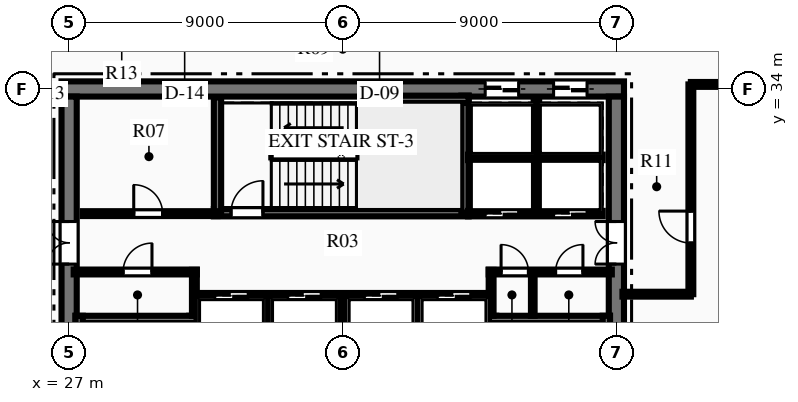
"""IFC4 building model, lengths in metres.
Left out: names, types, materials, properties, quantities, classifications, styles, units other than length and angle.
Written with IfcOpenShell. Run it as: python <this file> out.ifc"""

import sys

from ifc_helpers import new_model, si_unit, direction, frame, frame_2d, origin, place, context, subcontext, project, spatial, rectangle, extrude, element, fill, save


model = new_model("IFC4")
c1 = context("Model", 3, precision=1e-05, world=origin(), true_north=direction((0.0, 1.0)))
c2 = subcontext(c1, "Body", "Model", "MODEL_VIEW")
j1 = project(units=[si_unit("LENGTHUNIT", "METRE"), si_unit("PLANEANGLEUNIT", "RADIAN")], contexts=[c1])
p1 = place(None, origin())
s1 = spatial("IfcSite", under=j1, at=p1, CompositionType="ELEMENT")
p2 = place(p1, origin())
s2 = spatial("IfcBuilding", under=s1, at=p2, CompositionType="ELEMENT")
p3 = place(p2, frame((0.0, 0.0, 148.2)))
s3 = spatial("IfcBuildingStorey", under=s2, at=p3, CompositionType="ELEMENT", Elevation=148.2)
p4 = place(p3, frame((26.75, 34.0, 0.0), z_axis=(0.0, 0.0, 1.0), x_axis=(1.0, 0.0, 0.0)))
e1 = element("IfcWall", 1, at=p4, inside=s3, PredefinedType="SHEAR", context=c2, shape_type="SweptSolid", body=[
    extrude(rectangle(XDim=18.5, YDim=0.5, at=frame_2d((9.25, 0.0))), origin(), (0.0, 0.0, 1.0), 3.75),
])
p5 = place(p4, frame((13.935, 0.0, 0.0)))
e2 = element("IfcOpeningElement", 2, at=p5, cuts=e1, PredefinedType="OPENING", context=c2, shape_type="SweptSolid", body=[
    extrude(rectangle(XDim=1.1, YDim=2.15, at=frame_2d((0.55, 1.075))), frame((0.0, 0.26, 0.0), z_axis=(0.0, -1.0, 0.0), x_axis=(1.0, 0.0, 0.0)), (0.0, 0.0, 1.0), 0.52),
])
p6 = place(p4, frame((16.185, 0.0, 0.0)))
e3 = element("IfcOpeningElement", 3, at=p6, cuts=e1, PredefinedType="OPENING", context=c2, shape_type="SweptSolid", body=[
    extrude(rectangle(XDim=1.1, YDim=2.15, at=frame_2d((0.55, 1.075))), frame((0.0, 0.26, 0.0), z_axis=(0.0, -1.0, 0.0), x_axis=(1.0, 0.0, 0.0)), (0.0, 0.0, 1.0), 0.52),
])
p7 = place(p3, frame((27.0, 18.25, 0.0), z_axis=(0.0, 0.0, 1.0), x_axis=(0.0, 1.0, 0.0)))
e4 = element("IfcWall", 4, at=p7, inside=s3, PredefinedType="SHEAR", context=c2, shape_type="SweptSolid", body=[
    extrude(rectangle(XDim=15.5, YDim=0.5, at=frame_2d((7.75, 0.0))), origin(), (0.0, 0.0, 1.0), 3.75),
])
p8 = place(p7, frame((9.99, 0.0, 0.0)))
e5 = element("IfcOpeningElement", 5, at=p8, cuts=e4, PredefinedType="OPENING", context=c2, shape_type="SweptSolid", body=[
    extrude(rectangle(XDim=1.4, YDim=2.2, at=frame_2d((0.7, 1.1))), frame((0.0, 0.26, 0.0), z_axis=(0.0, -1.0, 0.0), x_axis=(1.0, 0.0, 0.0)), (0.0, 0.0, 1.0), 0.52),
])
p9 = place(p3, frame((45.0, 18.25, 0.0), z_axis=(0.0, 0.0, 1.0), x_axis=(0.0, 1.0, 0.0)))
e6 = element("IfcWall", 6, at=p9, inside=s3, PredefinedType="SHEAR", context=c2, shape_type="SweptSolid", body=[
    extrude(rectangle(XDim=15.5, YDim=0.5, at=frame_2d((7.75, 0.0))), origin(), (0.0, 0.0, 1.0), 3.75),
])
p10 = place(p9, frame((9.99, 0.0, 0.0)))
e7 = element("IfcOpeningElement", 7, at=p10, cuts=e6, PredefinedType="OPENING", context=c2, shape_type="SweptSolid", body=[
    extrude(rectangle(XDim=1.4, YDim=2.2, at=frame_2d((0.7, 1.1))), frame((0.0, 0.26, 0.0), z_axis=(0.0, -1.0, 0.0), x_axis=(1.0, 0.0, 0.0)), (0.0, 0.0, 1.0), 0.52),
])
p11 = place(p3, frame((31.07, 18.28, 0.0), z_axis=(0.0, 0.0, 1.0), x_axis=(0.0, 1.0, 0.0)))
e8 = element("IfcWall", 8, at=p11, inside=s3, PredefinedType="SHEAR", context=c2, shape_type="SweptSolid", body=[
    extrude(rectangle(XDim=8.26, YDim=0.24, at=frame_2d((4.13, 0.0))), origin(), (0.0, 0.0, 1.0), 3.75),
])
p12 = place(p11, frame((0.365, 0.0, 0.0)))
e9 = element("IfcOpeningElement", 9, at=p12, cuts=e8, PredefinedType="OPENING", context=c2, shape_type="SweptSolid", body=[
    extrude(rectangle(XDim=1.05, YDim=2.15, at=frame_2d((0.525, 1.075))), frame((0.0, 0.13, 0.0), z_axis=(0.0, -1.0, 0.0), x_axis=(1.0, 0.0, 0.0)), (0.0, 0.0, 1.0), 0.26),
])
p13 = place(p3, frame((27.21, 26.42, 0.0), z_axis=(0.0, 0.0, 1.0), x_axis=(1.0, 0.0, 0.0)))
e10 = element("IfcWall", 10, at=p13, inside=s3, PredefinedType="SHEAR", context=c2, shape_type="SweptSolid", body=[
    extrude(rectangle(XDim=3.98, YDim=0.24, at=frame_2d((1.99, 0.0))), origin(), (0.0, 0.0, 1.0), 3.75),
])
p14 = place(p3, frame((27.33, 18.28, 0.0), z_axis=(0.0, 0.0, 1.0), x_axis=(0.0, 1.0, 0.0)))
e11 = element("IfcWall", 11, at=p14, inside=s3, PredefinedType="SHEAR", context=c2, shape_type="SweptSolid", body=[
    extrude(rectangle(XDim=8.26, YDim=0.24, at=frame_2d((4.13, 0.0))), origin(), (0.0, 0.0, 1.0), 3.75),
])
p15 = place(p3, frame((40.93, 18.28, 0.0), z_axis=(0.0, 0.0, 1.0), x_axis=(0.0, 1.0, 0.0)))
e12 = element("IfcWall", 12, at=p15, inside=s3, PredefinedType="SHEAR", context=c2, shape_type="SweptSolid", body=[
    extrude(rectangle(XDim=8.26, YDim=0.24, at=frame_2d((4.13, 0.0))), origin(), (0.0, 0.0, 1.0), 3.75),
])
p16 = place(p15, frame((0.365, 0.0, 0.0)))
e13 = element("IfcOpeningElement", 13, at=p16, cuts=e12, PredefinedType="OPENING", context=c2, shape_type="SweptSolid", body=[
    extrude(rectangle(XDim=1.05, YDim=2.15, at=frame_2d((0.525, 1.075))), frame((0.0, 0.13, 0.0), z_axis=(0.0, -1.0, 0.0), x_axis=(1.0, 0.0, 0.0)), (0.0, 0.0, 1.0), 0.26),
])
p17 = place(p3, frame((40.81, 26.42, 0.0), z_axis=(0.0, 0.0, 1.0), x_axis=(1.0, 0.0, 0.0)))
e14 = element("IfcWall", 14, at=p17, inside=s3, PredefinedType="SHEAR", context=c2, shape_type="SweptSolid", body=[
    extrude(rectangle(XDim=3.98, YDim=0.24, at=frame_2d((1.99, 0.0))), origin(), (0.0, 0.0, 1.0), 3.75),
])
p18 = place(p3, frame((44.67, 18.28, 0.0), z_axis=(0.0, 0.0, 1.0), x_axis=(0.0, 1.0, 0.0)))
e15 = element("IfcWall", 15, at=p18, inside=s3, PredefinedType="SHEAR", context=c2, shape_type="SweptSolid", body=[
    extrude(rectangle(XDim=8.26, YDim=0.24, at=frame_2d((4.13, 0.0))), origin(), (0.0, 0.0, 1.0), 3.75),
])
p19 = place(p3, frame((31.76, 29.93, 0.0), z_axis=(0.0, 0.0, 1.0), x_axis=(1.0, 0.0, 0.0)))
e16 = element("IfcWall", 16, at=p19, inside=s3, PredefinedType="SHEAR", context=c2, shape_type="SweptSolid", body=[
    extrude(rectangle(XDim=8.38, YDim=0.24, at=frame_2d((4.19, 0.0))), origin(), (0.0, 0.0, 1.0), 3.75),
])
p20 = place(p19, frame((0.565, 0.0, 0.0)))
e17 = element("IfcOpeningElement", 17, at=p20, cuts=e16, PredefinedType="OPENING", context=c2, shape_type="SweptSolid", body=[
    extrude(rectangle(XDim=1.05, YDim=2.15, at=frame_2d((0.525, 1.075))), frame((0.0, 0.13, 0.0), z_axis=(0.0, -1.0, 0.0), x_axis=(1.0, 0.0, 0.0)), (0.0, 0.0, 1.0), 0.26),
])
p21 = place(p3, frame((31.88, 29.93, 0.0), z_axis=(0.0, 0.0, 1.0), x_axis=(0.0, 1.0, 0.0)))
e18 = element("IfcWall", 18, at=p21, inside=s3, PredefinedType="SHEAR", context=c2, shape_type="SweptSolid", body=[
    extrude(rectangle(XDim=3.79, YDim=0.24, at=frame_2d((1.895, 0.0))), origin(), (0.0, 0.0, 1.0), 3.75),
])
p22 = place(p3, frame((40.02, 29.93, 0.0), z_axis=(0.0, 0.0, 1.0), x_axis=(0.0, 1.0, 0.0)))
e19 = element("IfcWall", 19, at=p22, inside=s3, PredefinedType="SHEAR", context=c2, shape_type="SweptSolid", body=[
    extrude(rectangle(XDim=3.85, YDim=0.24, at=frame_2d((1.925, 0.0))), origin(), (0.0, 0.0, 1.0), 3.75),
])
p23 = place(p3, frame((37.85, 33.66, 0.0), z_axis=(0.0, 0.0, 1.0), x_axis=(1.0, 0.0, 0.0)))
e20 = element("IfcWall", 20, at=p23, inside=s3, PredefinedType="SHEAR", context=c2, shape_type="SweptSolid", body=[
    extrude(rectangle(XDim=2.29, YDim=0.24, at=frame_2d((1.145, 0.0))), origin(), (0.0, 0.0, 1.0), 3.75),
])
p24 = place(p3, frame((27.15, 27.98, 0.0), z_axis=(0.0, 0.0, 1.0), x_axis=(1.0, 0.0, 0.0)))
e21 = element("IfcWall", 21, at=p24, inside=s3, PredefinedType="PARTITIONING", context=c2, shape_type="SweptSolid", body=[
    extrude(rectangle(XDim=4.05, YDim=0.16, at=frame_2d((2.025, 0.0))), origin(), (0.0, 0.0, 1.0), 3.46),
])
p25 = place(p24, frame((1.625, 0.0, 0.0)))
e22 = element("IfcOpeningElement", 22, at=p25, cuts=e21, PredefinedType="OPENING", context=c2, shape_type="SweptSolid", body=[
    extrude(rectangle(XDim=0.95, YDim=2.15, at=frame_2d((0.475, 1.075))), frame((0.0, 0.09, 0.0), z_axis=(0.0, -1.0, 0.0), x_axis=(1.0, 0.0, 0.0)), (0.0, 0.0, 1.0), 0.18),
])
p26 = place(p3, frame((31.12, 26.54, 0.0), z_axis=(0.0, 0.0, 1.0), x_axis=(0.0, 1.0, 0.0)))
e23 = element("IfcWall", 23, at=p26, inside=s3, PredefinedType="PARTITIONING", context=c2, shape_type="SweptSolid", body=[
    extrude(rectangle(XDim=1.51, YDim=0.16, at=frame_2d((0.755, 0.0))), origin(), (0.0, 0.0, 1.0), 3.46),
])
p27 = place(p3, frame((40.8, 27.98, 0.0), z_axis=(0.0, 0.0, 1.0), x_axis=(1.0, 0.0, 0.0)))
e24 = element("IfcWall", 24, at=p27, inside=s3, PredefinedType="PARTITIONING", context=c2, shape_type="SweptSolid", body=[
    extrude(rectangle(XDim=4.05, YDim=0.16, at=frame_2d((2.025, 0.0))), origin(), (0.0, 0.0, 1.0), 3.46),
])
p28 = place(p27, frame((0.407, 0.0, 0.0)))
e25 = element("IfcOpeningElement", 25, at=p28, cuts=e24, PredefinedType="OPENING", context=c2, shape_type="SweptSolid", body=[
    extrude(rectangle(XDim=0.9, YDim=2.15, at=frame_2d((0.45, 1.075))), frame((0.0, 0.09, 0.0), z_axis=(0.0, -1.0, 0.0), x_axis=(1.0, 0.0, 0.0)), (0.0, 0.0, 1.0), 0.18),
])
p29 = place(p27, frame((2.2, 0.0, 0.0)))
e26 = element("IfcOpeningElement", 26, at=p29, cuts=e24, PredefinedType="OPENING", context=c2, shape_type="SweptSolid", body=[
    extrude(rectangle(XDim=0.9, YDim=2.15, at=frame_2d((0.45, 1.075))), frame((0.0, 0.09, 0.0), z_axis=(0.0, -1.0, 0.0), x_axis=(1.0, 0.0, 0.0)), (0.0, 0.0, 1.0), 0.18),
])
p30 = place(p3, frame((40.88, 26.54, 0.0), z_axis=(0.0, 0.0, 1.0), x_axis=(0.0, 1.0, 0.0)))
e27 = element("IfcWall", 27, at=p30, inside=s3, PredefinedType="PARTITIONING", context=c2, shape_type="SweptSolid", body=[
    extrude(rectangle(XDim=1.51, YDim=0.16, at=frame_2d((0.755, 0.0))), origin(), (0.0, 0.0, 1.0), 3.46),
])
p31 = place(p3, frame((42.25, 26.54, 0.0), z_axis=(0.0, 0.0, 1.0), x_axis=(0.0, 1.0, 0.0)))
e28 = element("IfcWall", 28, at=p31, inside=s3, PredefinedType="PARTITIONING", context=c2, shape_type="SweptSolid", body=[
    extrude(rectangle(XDim=1.44, YDim=0.12, at=frame_2d((0.72, 0.0))), origin(), (0.0, 0.0, 1.0), 3.46),
])
p32 = place(p3, frame((27.45, 29.9, 0.0), z_axis=(0.0, 0.0, 1.0), x_axis=(1.0, 0.0, 0.0)))
e29 = element("IfcWall", 29, at=p32, inside=s3, PredefinedType="PARTITIONING", context=c2, shape_type="SweptSolid", body=[
    extrude(rectangle(XDim=4.43, YDim=0.16, at=frame_2d((2.215, 0.0))), origin(), (0.0, 0.0, 1.0), 3.46),
])
p33 = place(p32, frame((1.675, 0.0, 0.0)))
e30 = element("IfcOpeningElement", 30, at=p33, cuts=e29, PredefinedType="OPENING", context=c2, shape_type="SweptSolid", body=[
    extrude(rectangle(XDim=0.95, YDim=2.15, at=frame_2d((0.475, 1.075))), frame((0.0, 0.09, 0.0), z_axis=(0.0, -1.0, 0.0), x_axis=(1.0, 0.0, 0.0)), (0.0, 0.0, 1.0), 0.18),
])
p34 = place(p3, frame((40.12, 29.9, 0.0), z_axis=(0.0, 0.0, 1.0), x_axis=(1.0, 0.0, 0.0)))
e31 = element("IfcWall", 31, at=p34, inside=s3, PredefinedType="PARTITIONING", context=c2, shape_type="SweptSolid", body=[
    extrude(rectangle(XDim=4.43, YDim=0.18, at=frame_2d((2.215, 0.0))), origin(), (0.0, 0.0, 1.0), 3.46),
])
p35 = place(p34, frame((0.565, 0.0, 0.0)))
e32 = element("IfcOpeningElement", 32, at=p35, cuts=e31, PredefinedType="OPENING", context=c2, shape_type="SweptSolid", body=[
    extrude(rectangle(XDim=1.1, YDim=2.15, at=frame_2d((0.55, 1.075))), frame((0.0, 0.1, 0.0), z_axis=(0.0, -1.0, 0.0), x_axis=(1.0, 0.0, 0.0)), (0.0, 0.0, 1.0), 0.2),
])
p36 = place(p34, frame((2.815, 0.0, 0.0)))
e33 = element("IfcOpeningElement", 33, at=p36, cuts=e31, PredefinedType="OPENING", context=c2, shape_type="SweptSolid", body=[
    extrude(rectangle(XDim=1.1, YDim=2.15, at=frame_2d((0.55, 1.075))), frame((0.0, 0.1, 0.0), z_axis=(0.0, -1.0, 0.0), x_axis=(1.0, 0.0, 0.0)), (0.0, 0.0, 1.0), 0.2),
])
p37 = place(p3, frame((40.12, 31.75, 0.0), z_axis=(0.0, 0.0, 1.0), x_axis=(1.0, 0.0, 0.0)))
e34 = element("IfcWall", 34, at=p37, inside=s3, PredefinedType="PARTITIONING", context=c2, shape_type="SweptSolid", body=[
    extrude(rectangle(XDim=4.43, YDim=0.18, at=frame_2d((2.215, 0.0))), origin(), (0.0, 0.0, 1.0), 3.46),
])
p38 = place(p3, frame((42.37, 29.9, 0.0), z_axis=(0.0, 0.0, 1.0), x_axis=(0.0, 1.0, 0.0)))
e35 = element("IfcWall", 35, at=p38, inside=s3, PredefinedType="PARTITIONING", context=c2, shape_type="SweptSolid", body=[
    extrude(rectangle(XDim=3.75, YDim=0.18, at=frame_2d((1.875, 0.0))), origin(), (0.0, 0.0, 1.0), 3.46),
])
p39 = place(p3, frame((31.2, 27.2, 0.0), z_axis=(0.0, 0.0, 1.0), x_axis=(1.0, 0.0, 0.0)))
e36 = element("IfcWall", 36, at=p39, inside=s3, PredefinedType="PARTITIONING", context=c2, shape_type="SweptSolid", body=[
    extrude(rectangle(XDim=9.6, YDim=0.18, at=frame_2d((4.8, 0.0))), origin(), (0.0, 0.0, 1.0), 3.46),
])
p40 = place(p39, frame((0.59, 0.0, 0.0)))
e37 = element("IfcOpeningElement", 37, at=p40, cuts=e36, PredefinedType="OPENING", context=c2, shape_type="SweptSolid", body=[
    extrude(rectangle(XDim=1.1, YDim=2.15, at=frame_2d((0.55, 1.075))), frame((0.0, 0.1, 0.0), z_axis=(0.0, -1.0, 0.0), x_axis=(1.0, 0.0, 0.0)), (0.0, 0.0, 1.0), 0.2),
])
p41 = place(p39, frame((2.99, 0.0, 0.0)))
e38 = element("IfcOpeningElement", 38, at=p41, cuts=e36, PredefinedType="OPENING", context=c2, shape_type="SweptSolid", body=[
    extrude(rectangle(XDim=1.1, YDim=2.15, at=frame_2d((0.55, 1.075))), frame((0.0, 0.1, 0.0), z_axis=(0.0, -1.0, 0.0), x_axis=(1.0, 0.0, 0.0)), (0.0, 0.0, 1.0), 0.2),
])
p42 = place(p39, frame((5.51, 0.0, 0.0)))
e39 = element("IfcOpeningElement", 39, at=p42, cuts=e36, PredefinedType="OPENING", context=c2, shape_type="SweptSolid", body=[
    extrude(rectangle(XDim=1.1, YDim=2.15, at=frame_2d((0.55, 1.075))), frame((0.0, 0.1, 0.0), z_axis=(0.0, -1.0, 0.0), x_axis=(1.0, 0.0, 0.0)), (0.0, 0.0, 1.0), 0.2),
])
p43 = place(p39, frame((7.91, 0.0, 0.0)))
e40 = element("IfcOpeningElement", 40, at=p43, cuts=e36, PredefinedType="OPENING", context=c2, shape_type="SweptSolid", body=[
    extrude(rectangle(XDim=1.1, YDim=2.15, at=frame_2d((0.55, 1.075))), frame((0.0, 0.1, 0.0), z_axis=(0.0, -1.0, 0.0), x_axis=(1.0, 0.0, 0.0)), (0.0, 0.0, 1.0), 0.2),
])
for number, where, z_axis, x_axis in (
    (41, (33.54, 25.3, 0.0), (0.0, 0.0, 1.0), (0.0, 1.0, 0.0)),
    (42, (36.0, 25.3, 0.0), (0.0, 0.0, 1.0), (0.0, 1.0, 0.0)),
    (43, (38.46, 25.3, 0.0), (0.0, 0.0, 1.0), (0.0, 1.0, 0.0)),
):
    element("IfcWall", number, at=place(p3, frame(where, z_axis=z_axis, x_axis=x_axis)), inside=s3, PredefinedType="PARTITIONING", context=c2, shape_type="SweptSolid", body=[
        extrude(rectangle(XDim=1.9, YDim=0.18, at=frame_2d((0.95, 0.0))), origin(), (0.0, 0.0, 1.0), 3.46),
    ])
p44 = place(p3, frame((47.45, 34.15, 0.0), z_axis=(0.0, 0.0, 1.0), x_axis=(1.0, 0.0, 0.0)))
e44 = element("IfcWall", 44, at=p44, inside=s3, PredefinedType="PARTITIONING", context=c2, shape_type="SweptSolid", body=[
    extrude(rectangle(XDim=6.35, YDim=0.16, at=frame_2d((3.175, 0.0))), origin(), (0.0, 0.0, 1.0), 3.46),
])
p45 = place(p3, frame((47.45, 27.25, 0.0), z_axis=(0.0, 0.0, 1.0), x_axis=(0.0, 1.0, 0.0)))
e45 = element("IfcWall", 45, at=p45, inside=s3, PredefinedType="PARTITIONING", context=c2, shape_type="SweptSolid", body=[
    extrude(rectangle(XDim=6.9, YDim=0.16, at=frame_2d((3.45, 0.0))), origin(), (0.0, 0.0, 1.0), 3.46),
])
p46 = place(p45, frame((1.683, 0.0, 0.0)))
e46 = element("IfcOpeningElement", 46, at=p46, cuts=e45, PredefinedType="OPENING", context=c2, shape_type="SweptSolid", body=[
    extrude(rectangle(XDim=1.05, YDim=2.15, at=frame_2d((0.525, 1.075))), frame((0.0, 0.09, 0.0), z_axis=(0.0, -1.0, 0.0), x_axis=(1.0, 0.0, 0.0)), (0.0, 0.0, 1.0), 0.18),
])
p47 = place(p3, frame((45.2, 27.25, 0.0), z_axis=(0.0, 0.0, 1.0), x_axis=(1.0, 0.0, 0.0)))
e47 = element("IfcWall", 47, at=p47, inside=s3, PredefinedType="PARTITIONING", context=c2, shape_type="SweptSolid", body=[
    extrude(rectangle(XDim=2.25, YDim=0.16, at=frame_2d((1.125, 0.0))), origin(), (0.0, 0.0, 1.0), 3.46),
])
p48 = place(p25, origin())
e48 = element("IfcDoor", 48, at=p48, inside=s3, OperationType="SINGLE_SWING_RIGHT", PredefinedType="DOOR", context=c2, shape_type="SweptSolid", body=[
    extrude(rectangle(XDim=0.95, YDim=2.15, at=frame_2d((0.475, 1.075))), frame((0.0, 0.025, 0.0), z_axis=(0.0, -1.0, 0.0), x_axis=(1.0, 0.0, 0.0)), (0.0, 0.0, 1.0), 0.05),
])
fill(e22, e48)
p49 = place(p28, origin())
e49 = element("IfcDoor", 49, at=p49, inside=s3, OperationType="SINGLE_SWING_LEFT", PredefinedType="DOOR", context=c2, shape_type="SweptSolid", body=[
    extrude(rectangle(XDim=0.9, YDim=2.15, at=frame_2d((0.45, 1.075))), frame((0.0, 0.025, 0.0), z_axis=(0.0, -1.0, 0.0), x_axis=(1.0, 0.0, 0.0)), (0.0, 0.0, 1.0), 0.05),
])
fill(e25, e49)
p50 = place(p29, origin())
e50 = element("IfcDoor", 50, at=p50, inside=s3, OperationType="SINGLE_SWING_RIGHT", PredefinedType="DOOR", context=c2, shape_type="SweptSolid", body=[
    extrude(rectangle(XDim=0.9, YDim=2.15, at=frame_2d((0.45, 1.075))), frame((0.0, 0.025, 0.0), z_axis=(0.0, -1.0, 0.0), x_axis=(1.0, 0.0, 0.0)), (0.0, 0.0, 1.0), 0.05),
])
fill(e26, e50)
p51 = place(p33, origin())
e51 = element("IfcDoor", 51, at=p51, inside=s3, OperationType="SINGLE_SWING_LEFT", PredefinedType="DOOR", context=c2, shape_type="SweptSolid", body=[
    extrude(rectangle(XDim=0.95, YDim=2.15, at=frame_2d((0.475, 1.075))), frame((0.0, 0.025, 0.0), z_axis=(0.0, -1.0, 0.0), x_axis=(1.0, 0.0, 0.0)), (0.0, 0.0, 1.0), 0.05),
])
fill(e30, e51)
p52 = place(p20, origin())
e52 = element("IfcDoor", 52, at=p52, inside=s3, OperationType="SINGLE_SWING_RIGHT", PredefinedType="DOOR", context=c2, shape_type="SweptSolid", body=[
    extrude(rectangle(XDim=1.05, YDim=2.15, at=frame_2d((0.525, 1.075))), frame((0.0, 0.025, 0.0), z_axis=(0.0, -1.0, 0.0), x_axis=(1.0, 0.0, 0.0)), (0.0, 0.0, 1.0), 0.05),
])
fill(e17, e52)
p53 = place(p8, origin())
e53 = element("IfcDoor", 53, at=p53, inside=s3, OperationType="DOUBLE_DOOR_SINGLE_SWING", PredefinedType="DOOR", context=c2, shape_type="SweptSolid", body=[
    extrude(rectangle(XDim=1.4, YDim=2.2, at=frame_2d((0.7, 1.1))), frame((0.0, 0.025, 0.0), z_axis=(0.0, -1.0, 0.0), x_axis=(1.0, 0.0, 0.0)), (0.0, 0.0, 1.0), 0.05),
])
fill(e5, e53)
p54 = place(p10, origin())
e54 = element("IfcDoor", 54, at=p54, inside=s3, OperationType="DOUBLE_DOOR_SINGLE_SWING", PredefinedType="DOOR", context=c2, shape_type="SweptSolid", body=[
    extrude(rectangle(XDim=1.4, YDim=2.2, at=frame_2d((0.7, 1.1))), frame((0.0, 0.025, 0.0), z_axis=(0.0, -1.0, 0.0), x_axis=(1.0, 0.0, 0.0)), (0.0, 0.0, 1.0), 0.05),
])
fill(e7, e54)
p55 = place(p46, origin())
e55 = element("IfcDoor", 55, at=p55, inside=s3, OperationType="SINGLE_SWING_RIGHT", PredefinedType="DOOR", context=c2, shape_type="SweptSolid", body=[
    extrude(rectangle(XDim=1.05, YDim=2.15, at=frame_2d((0.525, 1.075))), frame((0.0, 0.025, 0.0), z_axis=(0.0, -1.0, 0.0), x_axis=(1.0, 0.0, 0.0)), (0.0, 0.0, 1.0), 0.05),
])
fill(e46, e55)
p56 = place(p35, origin())
e56 = element("IfcDoor", 56, at=p56, inside=s3, OperationType="SLIDING_TO_LEFT", PredefinedType="DOOR", context=c2, shape_type="SweptSolid", body=[
    extrude(rectangle(XDim=1.1, YDim=2.15, at=frame_2d((0.55, 1.075))), frame((0.0, 0.025, 0.0), z_axis=(0.0, -1.0, 0.0), x_axis=(1.0, 0.0, 0.0)), (0.0, 0.0, 1.0), 0.05),
])
fill(e32, e56)
p57 = place(p36, origin())
e57 = element("IfcDoor", 57, at=p57, inside=s3, OperationType="SLIDING_TO_LEFT", PredefinedType="DOOR", context=c2, shape_type="SweptSolid", body=[
    extrude(rectangle(XDim=1.1, YDim=2.15, at=frame_2d((0.55, 1.075))), frame((0.0, 0.025, 0.0), z_axis=(0.0, -1.0, 0.0), x_axis=(1.0, 0.0, 0.0)), (0.0, 0.0, 1.0), 0.05),
])
fill(e33, e57)
p58 = place(p5, origin())
e58 = element("IfcDoor", 58, at=p58, inside=s3, OperationType="SLIDING_TO_LEFT", PredefinedType="DOOR", context=c2, shape_type="SweptSolid", body=[
    extrude(rectangle(XDim=1.1, YDim=2.15, at=frame_2d((0.55, 1.075))), frame((0.0, 0.025, 0.0), z_axis=(0.0, -1.0, 0.0), x_axis=(1.0, 0.0, 0.0)), (0.0, 0.0, 1.0), 0.05),
])
fill(e2, e58)
p59 = place(p6, origin())
e59 = element("IfcDoor", 59, at=p59, inside=s3, OperationType="SLIDING_TO_LEFT", PredefinedType="DOOR", context=c2, shape_type="SweptSolid", body=[
    extrude(rectangle(XDim=1.1, YDim=2.15, at=frame_2d((0.55, 1.075))), frame((0.0, 0.025, 0.0), z_axis=(0.0, -1.0, 0.0), x_axis=(1.0, 0.0, 0.0)), (0.0, 0.0, 1.0), 0.05),
])
fill(e3, e59)
p60 = place(p40, origin())
e60 = element("IfcDoor", 60, at=p60, inside=s3, OperationType="SLIDING_TO_LEFT", PredefinedType="DOOR", context=c2, shape_type="SweptSolid", body=[
    extrude(rectangle(XDim=1.1, YDim=2.15, at=frame_2d((0.55, 1.075))), frame((0.0, 0.025, 0.0), z_axis=(0.0, -1.0, 0.0), x_axis=(1.0, 0.0, 0.0)), (0.0, 0.0, 1.0), 0.05),
])
fill(e37, e60)
p61 = place(p41, origin())
e61 = element("IfcDoor", 61, at=p61, inside=s3, OperationType="SLIDING_TO_LEFT", PredefinedType="DOOR", context=c2, shape_type="SweptSolid", body=[
    extrude(rectangle(XDim=1.1, YDim=2.15, at=frame_2d((0.55, 1.075))), frame((0.0, 0.025, 0.0), z_axis=(0.0, -1.0, 0.0), x_axis=(1.0, 0.0, 0.0)), (0.0, 0.0, 1.0), 0.05),
])
fill(e38, e61)
p62 = place(p42, origin())
e62 = element("IfcDoor", 62, at=p62, inside=s3, OperationType="SLIDING_TO_LEFT", PredefinedType="DOOR", context=c2, shape_type="SweptSolid", body=[
    extrude(rectangle(XDim=1.1, YDim=2.15, at=frame_2d((0.55, 1.075))), frame((0.0, 0.025, 0.0), z_axis=(0.0, -1.0, 0.0), x_axis=(1.0, 0.0, 0.0)), (0.0, 0.0, 1.0), 0.05),
])
fill(e39, e62)
p63 = place(p43, origin())
e63 = element("IfcDoor", 63, at=p63, inside=s3, OperationType="SLIDING_TO_LEFT", PredefinedType="DOOR", context=c2, shape_type="SweptSolid", body=[
    extrude(rectangle(XDim=1.1, YDim=2.15, at=frame_2d((0.55, 1.075))), frame((0.0, 0.025, 0.0), z_axis=(0.0, -1.0, 0.0), x_axis=(1.0, 0.0, 0.0)), (0.0, 0.0, 1.0), 0.05),
])
fill(e40, e63)
save(model, sys.argv[1])
